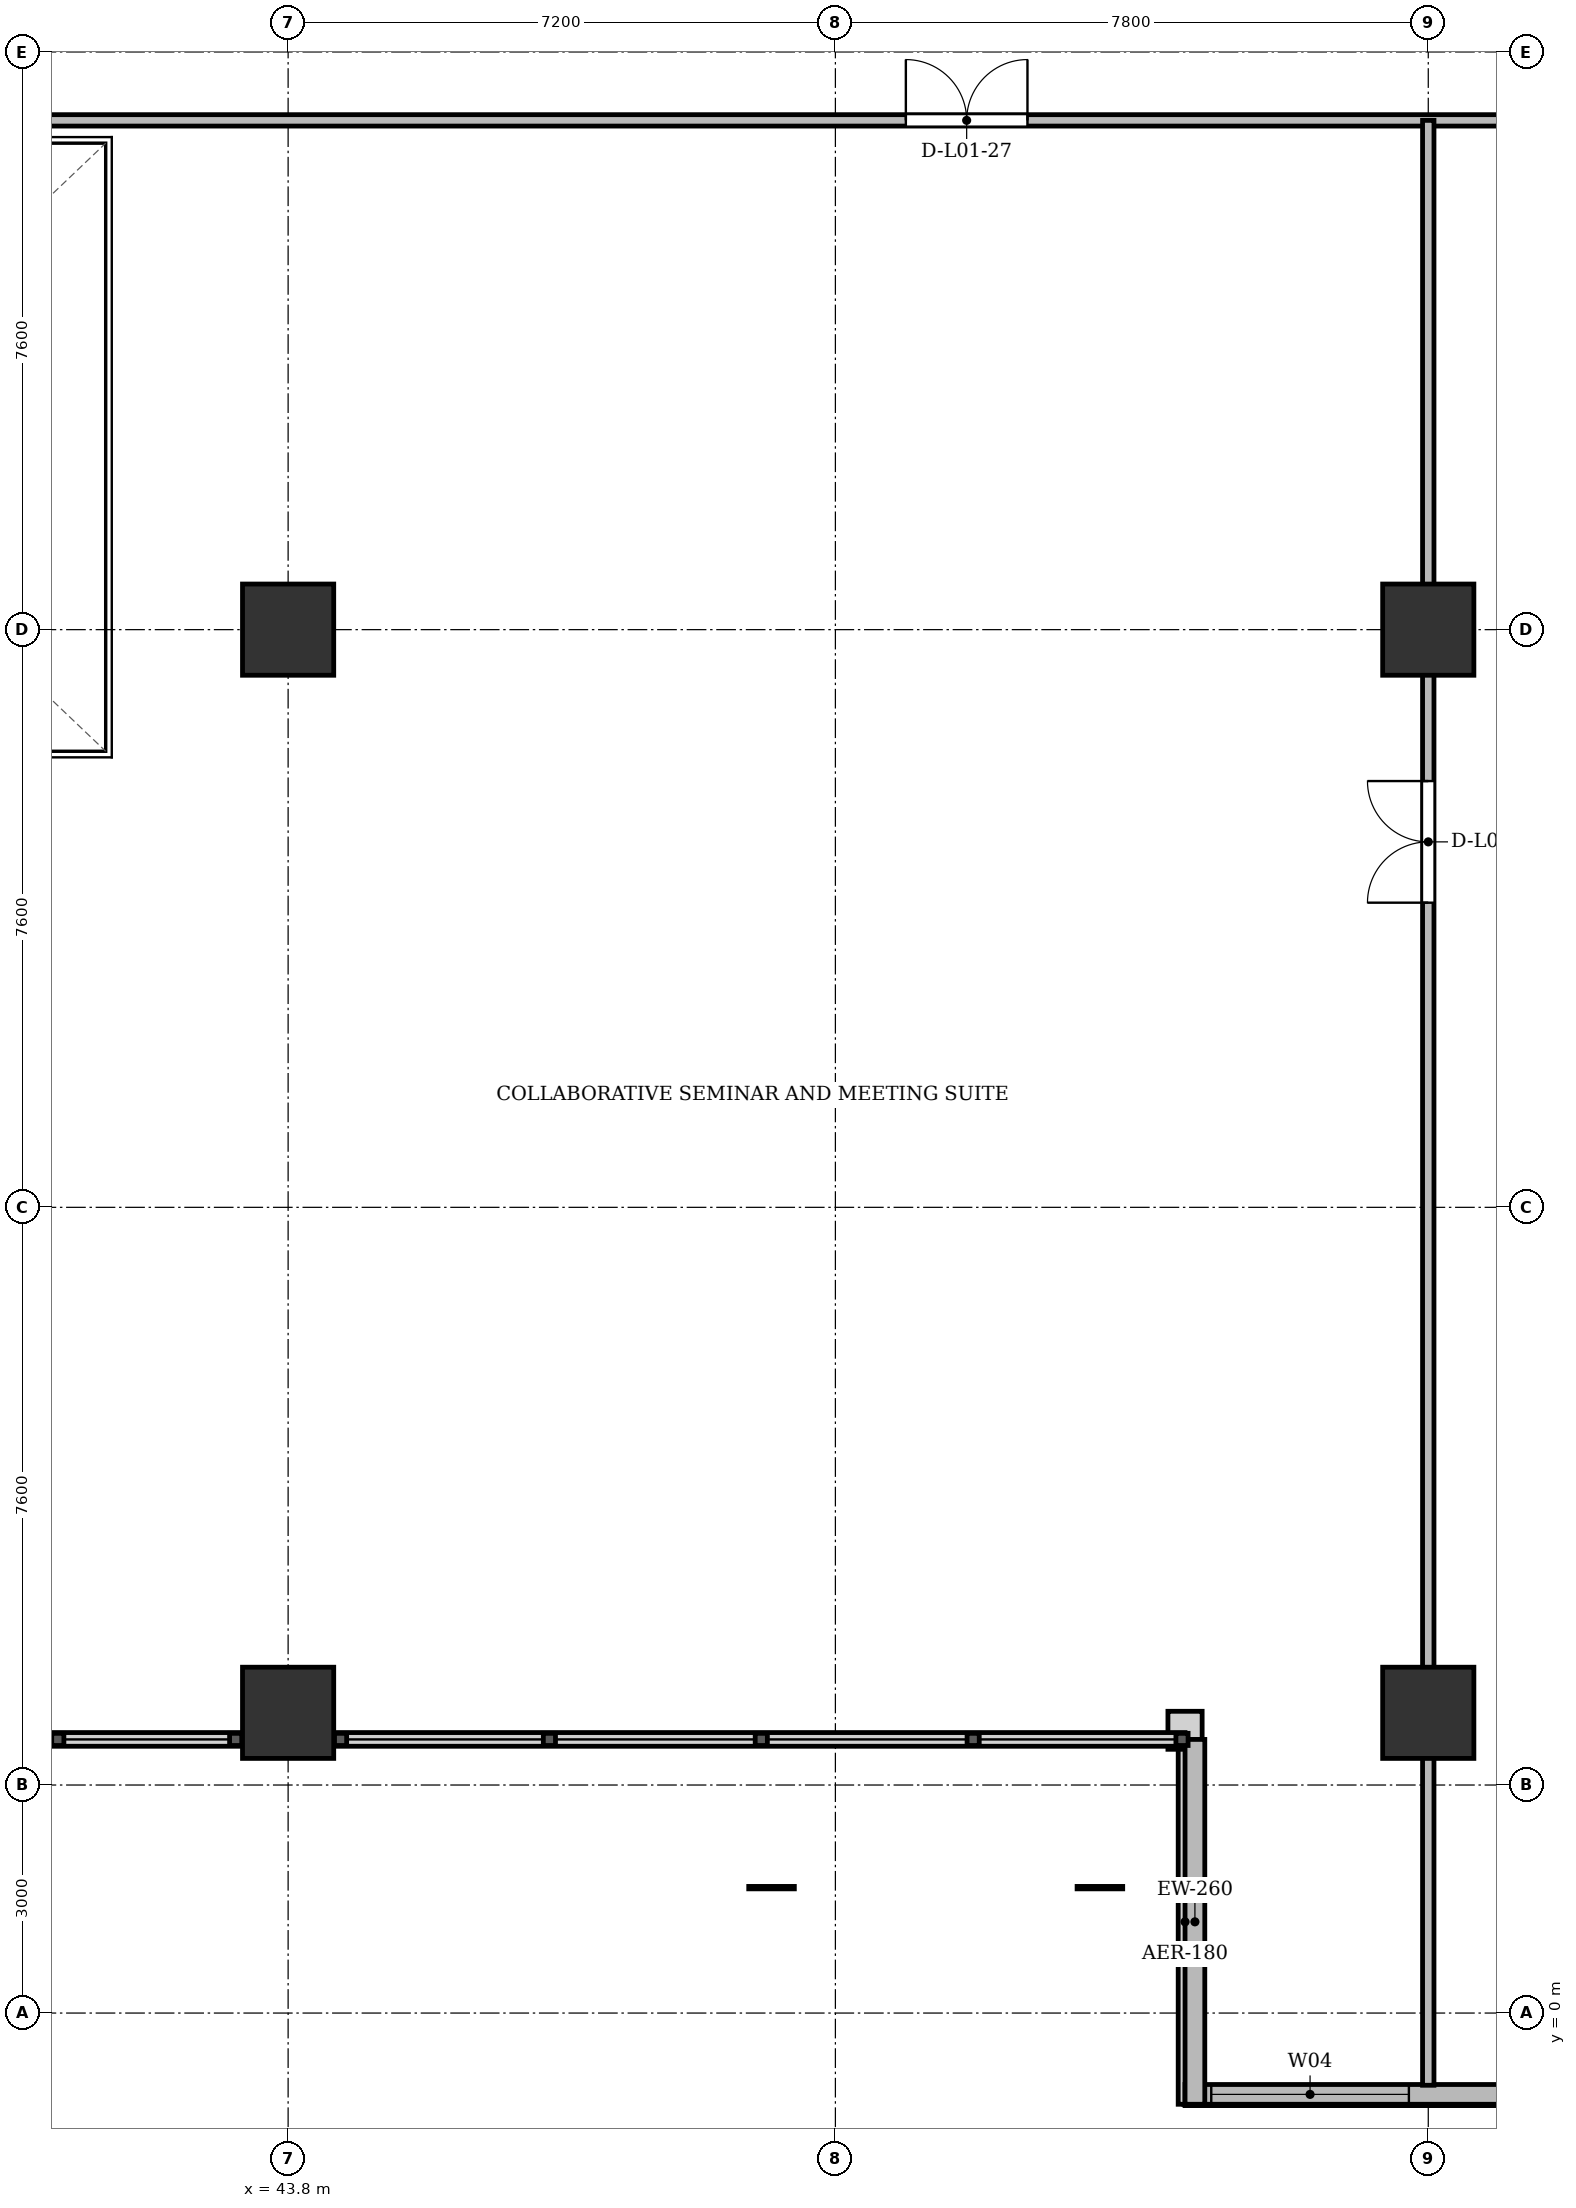
"""IFC4 building model, lengths in metres.
Left out: names, types, materials, properties, quantities, classifications, styles, units other than length and angle.
Written with IfcOpenShell. Run it as: python <this file> out.ifc"""

import sys

from ifc_helpers import new_model, si_unit, direction, frame, frame_2d, origin, origin_2d, place, context, subcontext, project, spatial, rectangle, extrude, source, transform, mapped, element, fill, save


model = new_model("IFC4")
c1 = context("Model", 3, precision=1e-05, world=origin(), true_north=direction((0.0, 1.0)))
c2 = subcontext(c1, "Body", "Model", "MODEL_VIEW")
j1 = project(units=[si_unit("LENGTHUNIT", "METRE"), si_unit("PLANEANGLEUNIT", "RADIAN")], contexts=[c1])
p1 = place(None, origin())
s1 = spatial("IfcSite", under=j1, at=p1, CompositionType="ELEMENT")
p2 = place(p1, origin())
s2 = spatial("IfcBuilding", under=s1, at=p2, CompositionType="ELEMENT")
p3 = place(p2, frame((0.0, 0.0, 5.2)))
s3 = spatial("IfcBuildingStorey", under=s2, at=p3, CompositionType="ELEMENT", Elevation=5.2)
m1 = source(origin(), c2, "Body", "SweptSolid", [
    extrude(rectangle(XDim=1.2, YDim=1.2, at=origin_2d()), origin(), (0.0, 0.0, 1.0), 4.5),
])
for number, where, z_axis, x_axis in (
    (1, (43.8, 3.95, 0.0), (0.0, 0.0, 1.0), (1.0, 0.0, 0.0)),
    (2, (43.8, 18.2, 0.0), (0.0, 0.0, 1.0), (1.0, 0.0, 0.0)),
    (3, (58.8, 3.95, 0.0), (0.0, 0.0, 1.0), (1.0, 0.0, 0.0)),
    (4, (58.8, 18.2, 0.0), (0.0, 0.0, 1.0), (1.0, 0.0, 0.0)),
):
    element("IfcColumn", number, at=place(p3, frame(where, z_axis=z_axis, x_axis=x_axis)), inside=s3, PredefinedType="COLUMN", context=c2, shape_type="MappedRepresentation", body=[
        mapped(m1, transform((0.0, 0.0, 0.0), x_axis=(1.0, 0.0, 0.0), y_axis=(0.0, 1.0, 0.0), z_axis=(0.0, 0.0, 1.0), scale=1.0)),
    ])
p4 = place(p3, frame((77.6, -1.07, 0.0), z_axis=(0.0, 0.0, 1.0), x_axis=(-1.0, 0.0, 0.0)))
e5 = element("IfcWall", 5, at=p4, inside=s3, PredefinedType="SOLIDWALL", context=c2, shape_type="SweptSolid", body=[
    extrude(rectangle(XDim=22.0, YDim=0.26, at=frame_2d((11.0, 0.0))), origin(), (0.0, 0.0, 1.0), 4.2),
])
p5 = place(p4, frame((8.245, 0.0, 0.9)))
e6 = element("IfcOpeningElement", 6, at=p5, cuts=e5, PredefinedType="OPENING", context=c2, shape_type="SweptSolid", body=[
    extrude(rectangle(XDim=2.4, YDim=2.1, at=frame_2d((1.2, 1.05))), frame((0.0, 0.14, 0.0), z_axis=(0.0, -1.0, 0.0), x_axis=(1.0, 0.0, 0.0)), (0.0, 0.0, 1.0), 0.28),
])
p6 = place(p4, frame((19.055, 0.0, 0.9)))
e7 = element("IfcOpeningElement", 7, at=p6, cuts=e5, PredefinedType="OPENING", context=c2, shape_type="SweptSolid", body=[
    extrude(rectangle(XDim=2.6, YDim=1.9, at=frame_2d((1.3, 0.95))), frame((0.0, 0.14, 0.0), z_axis=(0.0, -1.0, 0.0), x_axis=(1.0, 0.0, 0.0)), (0.0, 0.0, 1.0), 0.28),
])
p7 = place(p3, frame((55.73, -1.2, 0.0), z_axis=(0.0, 0.0, 1.0), x_axis=(0.0, 1.0, 0.0)))
e8 = element("IfcWall", 8, at=p7, inside=s3, PredefinedType="SOLIDWALL", context=c2, shape_type="SweptSolid", body=[
    extrude(rectangle(XDim=4.8, YDim=0.26, at=frame_2d((2.4, 0.0))), origin(), (0.0, 0.0, 1.0), 4.2),
])
p8 = place(p3, frame((-2.95, 24.9, 0.0), z_axis=(0.0, 0.0, 1.0), x_axis=(1.0, 0.0, 0.0)))
e9 = element("IfcWall", 9, at=p8, inside=s3, PredefinedType="PARTITIONING", context=c2, shape_type="SweptSolid", body=[
    extrude(rectangle(XDim=80.3, YDim=0.15, at=frame_2d((40.15, 0.0))), origin(), (0.0, 0.0, 1.0), 3.4),
])
p9 = place(p8, frame((2.484, 0.0, 0.0)))
e10 = element("IfcOpeningElement", 10, at=p9, cuts=e9, PredefinedType="OPENING", context=c2, shape_type="SweptSolid", body=[
    extrude(rectangle(XDim=1.6, YDim=2.2, at=frame_2d((0.8, 1.1))), frame((0.0, 0.085, 0.0), z_axis=(0.0, -1.0, 0.0), x_axis=(1.0, 0.0, 0.0)), (0.0, 0.0, 1.0), 0.17),
])
p10 = place(p8, frame((24.004, 0.0, 0.0)))
e11 = element("IfcOpeningElement", 11, at=p10, cuts=e9, PredefinedType="OPENING", context=c2, shape_type="SweptSolid", body=[
    extrude(rectangle(XDim=1.6, YDim=2.2, at=frame_2d((0.8, 1.1))), frame((0.0, 0.085, 0.0), z_axis=(0.0, -1.0, 0.0), x_axis=(1.0, 0.0, 0.0)), (0.0, 0.0, 1.0), 0.17),
])
p11 = place(p8, frame((54.877, 0.0, 0.0)))
e12 = element("IfcOpeningElement", 12, at=p11, cuts=e9, PredefinedType="OPENING", context=c2, shape_type="SweptSolid", body=[
    extrude(rectangle(XDim=1.6, YDim=2.2, at=frame_2d((0.8, 1.1))), frame((0.0, 0.085, 0.0), z_axis=(0.0, -1.0, 0.0), x_axis=(1.0, 0.0, 0.0)), (0.0, 0.0, 1.0), 0.17),
])
p12 = place(p8, frame((76.577, 0.0, 0.0)))
e13 = element("IfcOpeningElement", 13, at=p12, cuts=e9, PredefinedType="OPENING", context=c2, shape_type="SweptSolid", body=[
    extrude(rectangle(XDim=1.6, YDim=2.2, at=frame_2d((0.8, 1.1))), frame((0.0, 0.085, 0.0), z_axis=(0.0, -1.0, 0.0), x_axis=(1.0, 0.0, 0.0)), (0.0, 0.0, 1.0), 0.17),
])
p13 = place(p3, frame((58.8, -0.95, 0.0), z_axis=(0.0, 0.0, 1.0), x_axis=(0.0, 1.0, 0.0)))
e14 = element("IfcWall", 14, at=p13, inside=s3, PredefinedType="PARTITIONING", context=c2, shape_type="SweptSolid", body=[
    extrude(rectangle(XDim=25.85, YDim=0.15, at=frame_2d((12.925, 0.0))), origin(), (0.0, 0.0, 1.0), 3.4),
])
p14 = place(p13, frame((15.558, 0.0, 0.0)))
e15 = element("IfcOpeningElement", 15, at=p14, cuts=e14, PredefinedType="OPENING", context=c2, shape_type="SweptSolid", body=[
    extrude(rectangle(XDim=1.6, YDim=2.2, at=frame_2d((0.8, 1.1))), frame((0.0, 0.085, 0.0), z_axis=(0.0, -1.0, 0.0), x_axis=(1.0, 0.0, 0.0)), (0.0, 0.0, 1.0), 0.17),
])
m2 = source(origin(), c2, "Body", "SweptSolid", [
    extrude(rectangle(XDim=2.6, YDim=1.9, at=frame_2d((1.3, 0.95))), frame((0.0, 0.03, 0.0), z_axis=(0.0, -1.0, 0.0), x_axis=(1.0, 0.0, 0.0)), (0.0, 0.0, 1.0), 0.06),
])
p15 = place(p6, origin())
e16 = element("IfcWindow", 16, at=p15, inside=s3, PartitioningType="SINGLE_PANEL", PredefinedType="WINDOW", context=c2, shape_type="MappedRepresentation", body=[
    mapped(m2, transform((0.0, 0.0, 0.0), x_axis=(1.0, 0.0, 0.0), y_axis=(0.0, 1.0, 0.0), z_axis=(0.0, 0.0, 1.0), scale=1.0)),
])
fill(e7, e16)
m3 = source(origin(), c2, "Body", "SweptSolid", [
    extrude(rectangle(XDim=1.6, YDim=2.2, at=frame_2d((0.8, 1.1))), frame((0.0, 0.025, 0.0), z_axis=(0.0, -1.0, 0.0), x_axis=(1.0, 0.0, 0.0)), (0.0, 0.0, 1.0), 0.05),
])
p16 = place(p11, origin())
e17 = element("IfcDoor", 17, at=p16, inside=s3, OperationType="DOUBLE_DOOR_SINGLE_SWING", PredefinedType="DOOR", context=c2, shape_type="MappedRepresentation", body=[
    mapped(m3, transform((0.0, 0.0, 0.0), x_axis=(1.0, 0.0, 0.0), y_axis=(0.0, 1.0, 0.0), z_axis=(0.0, 0.0, 1.0), scale=1.0)),
])
fill(e12, e17)
p17 = place(p14, origin())
e18 = element("IfcDoor", 18, at=p17, inside=s3, OperationType="DOUBLE_DOOR_SINGLE_SWING", PredefinedType="DOOR", context=c2, shape_type="MappedRepresentation", body=[
    mapped(m3, transform((0.0, 0.0, 0.0), x_axis=(1.0, 0.0, 0.0), y_axis=(0.0, 1.0, 0.0), z_axis=(0.0, 0.0, 1.0), scale=1.0)),
])
fill(e15, e18)
save(model, sys.argv[1])
